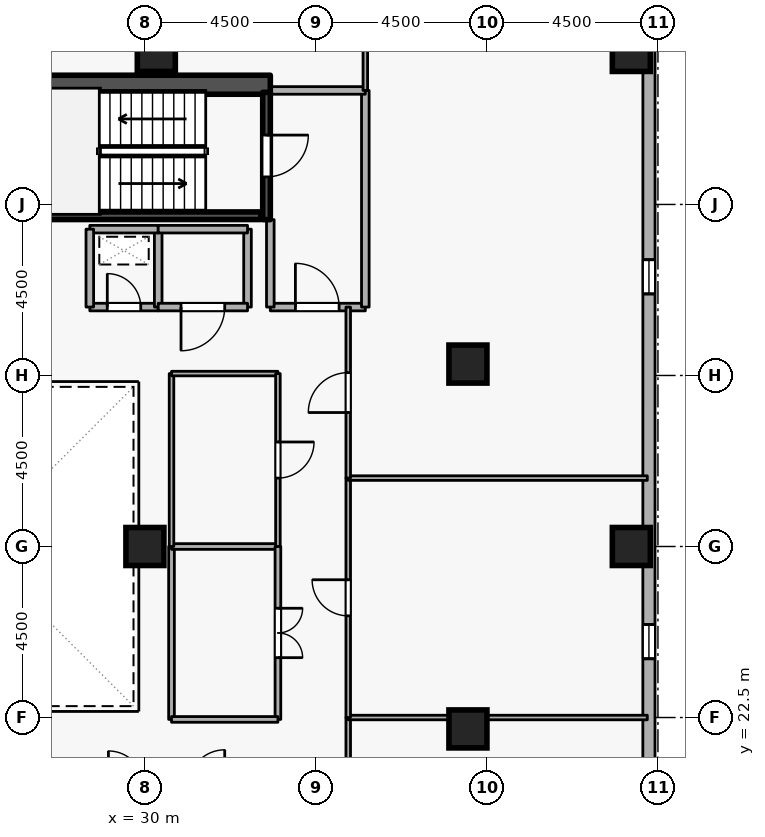
"""IFC4 building model, lengths in metres.
Left out: names, types, materials, properties, quantities, classifications, styles, units other than length and angle.
Written with IfcOpenShell. Run it as: python <this file> out.ifc"""

import sys

from ifc_helpers import new_model, si_unit, direction, frame, frame_2d, origin, origin_2d, place, context, subcontext, project, spatial, rectangle, extrude, element, fill, save


model = new_model("IFC4")
c1 = context("Model", 3, precision=1e-05, world=origin(), true_north=direction((0.0, 1.0)))
c2 = subcontext(c1, "Body", "Model", "MODEL_VIEW")
j1 = project(units=[si_unit("LENGTHUNIT", "METRE"), si_unit("PLANEANGLEUNIT", "RADIAN")], contexts=[c1])
p1 = place(None, origin())
s1 = spatial("IfcSite", under=j1, at=p1, CompositionType="ELEMENT")
p2 = place(p1, origin())
s2 = spatial("IfcBuilding", under=s1, at=p2, CompositionType="ELEMENT")
p3 = place(p2, frame((0.0, 0.0, 210.9)))
s3 = spatial("IfcBuildingStorey", under=s2, at=p3, CompositionType="ELEMENT", Elevation=210.9)
p4 = place(p3, frame((17.7, 39.15, 0.0), z_axis=(0.0, 0.0, 1.0), x_axis=(1.0, 0.0, 0.0)))
e1 = element("IfcWall", 1, at=p4, inside=s3, PredefinedType="SHEAR", context=c2, shape_type="SweptSolid", body=[
    extrude(rectangle(XDim=15.6, YDim=0.5, at=frame_2d((7.8, 0.0))), origin(), (0.0, 0.0, 1.0), 3.6),
])
for number, where, z_axis, x_axis in (
    (2, (42.8, 27.0, 0.0), (0.0, 0.0, 1.0), (1.0, 0.0, 0.0)),
    (3, (42.8, 40.0, 0.0), (0.0, 0.0, 1.0), (1.0, 0.0, 0.0)),
    (4, (38.5, 22.2, 0.0), (0.0, 0.0, 1.0), (1.0, 0.0, 0.0)),
    (5, (38.5, 31.8, 0.0), (0.0, 0.0, 1.0), (1.0, 0.0, 0.0)),
    (6, (30.3, 40.0, 0.0), (0.0, 0.0, 1.0), (1.0, 0.0, 0.0)),
    (7, (30.0, 27.0, 0.0), (0.0, 0.0, 1.0), (1.0, 0.0, 0.0)),
):
    element("IfcColumn", number, at=place(p3, frame(where, z_axis=z_axis, x_axis=x_axis)), inside=s3, PredefinedType="COLUMN", context=c2, shape_type="SweptSolid", body=[
        extrude(rectangle(XDim=1.0, YDim=1.0, at=origin_2d()), origin(), (0.0, 0.0, 1.0), 3.6),
    ])
p5 = place(p3, frame((43.262, 12.646, 0.0), z_axis=(0.0, 0.0, 1.0), x_axis=(7.5574884e-05, 0.999999997144, 0.0)))
e8 = element("IfcWall", 8, at=p5, inside=s3, PredefinedType="STANDARD", context=c2, shape_type="SweptSolid", body=[
    extrude(rectangle(XDim=35.535, YDim=0.32, at=frame_2d((17.768, 0.0))), origin(), (0.0, 0.0, 1.0), 2.7),
])
p6 = place(p5, frame((6.6, 0.0, 0.72)))
e9 = element("IfcOpeningElement", 9, at=p6, cuts=e8, PredefinedType="OPENING", context=c2, shape_type="SweptSolid", body=[
    extrude(rectangle(XDim=0.9, YDim=1.75, at=frame_2d((0.45, 0.875))), frame((0.0, 0.17, 0.0), z_axis=(0.0, -1.0, 0.0), x_axis=(1.0, 0.0, 0.0)), (0.0, 0.0, 1.0), 0.34),
])
p7 = place(p5, frame((11.4, 0.0, 0.72)))
e10 = element("IfcOpeningElement", 10, at=p7, cuts=e8, PredefinedType="OPENING", context=c2, shape_type="SweptSolid", body=[
    extrude(rectangle(XDim=0.9, YDim=1.75, at=frame_2d((0.45, 0.875))), frame((0.0, 0.17, 0.0), z_axis=(0.0, -1.0, 0.0), x_axis=(1.0, 0.0, 0.0)), (0.0, 0.0, 1.0), 0.34),
])
p8 = place(p5, frame((21.0, 0.0, 0.72)))
e11 = element("IfcOpeningElement", 11, at=p8, cuts=e8, PredefinedType="OPENING", context=c2, shape_type="SweptSolid", body=[
    extrude(rectangle(XDim=0.9, YDim=1.75, at=frame_2d((0.45, 0.875))), frame((0.0, 0.17, 0.0), z_axis=(0.0, -1.0, 0.0), x_axis=(1.0, 0.0, 0.0)), (0.0, 0.0, 1.0), 0.34),
])
p9 = place(p5, frame((30.6, 0.0, 0.72)))
e12 = element("IfcOpeningElement", 12, at=p9, cuts=e8, PredefinedType="OPENING", context=c2, shape_type="SweptSolid", body=[
    extrude(rectangle(XDim=0.9, YDim=1.75, at=frame_2d((0.45, 0.875))), frame((0.0, 0.17, 0.0), z_axis=(0.0, -1.0, 0.0), x_axis=(1.0, 0.0, 0.0)), (0.0, 0.0, 1.0), 0.34),
])
p10 = place(p3, frame((33.2, 38.95, 0.0), z_axis=(0.0, 0.0, 1.0), x_axis=(0.0, -1.0, 0.0)))
e13 = element("IfcWall", 13, at=p10, inside=s3, PredefinedType="SHEAR", context=c2, shape_type="SweptSolid", body=[
    extrude(rectangle(XDim=3.35, YDim=0.2, at=frame_2d((1.675, 0.0))), origin(), (0.0, 0.0, 1.0), 3.6),
])
p11 = place(p10, frame((1.125, 0.0, 0.0)))
e14 = element("IfcOpeningElement", 14, at=p11, cuts=e13, PredefinedType="OPENING", context=c2, shape_type="SweptSolid", body=[
    extrude(rectangle(XDim=1.1, YDim=2.1, at=frame_2d((0.55, 1.05))), frame((0.0, 0.11, 0.0), z_axis=(0.0, -1.0, 0.0), x_axis=(1.0, 0.0, 0.0)), (0.0, 0.0, 1.0), 0.22),
])
p12 = place(p3, frame((25.95, 35.703, 0.0), z_axis=(0.0, 0.0, 1.0), x_axis=(1.0, 0.0, 0.0)))
e15 = element("IfcWall", 15, at=p12, inside=s3, PredefinedType="SHEAR", context=c2, shape_type="SweptSolid", body=[
    extrude(rectangle(XDim=7.1, YDim=0.2, at=frame_2d((3.55, 0.0))), origin(), (0.0, 0.0, 1.0), 3.6),
])
p13 = place(p3, frame((33.3, 33.3, 0.0), z_axis=(0.0, 0.0, 1.0), x_axis=(1.0, 0.0, 0.0)))
e16 = element("IfcWall", 16, at=p13, inside=s3, PredefinedType="STANDARD", context=c2, shape_type="SweptSolid", body=[
    extrude(rectangle(XDim=2.5, YDim=0.2, at=frame_2d((1.25, 0.0))), origin(), (0.0, 0.0, 1.0), 3.34),
])
p14 = place(p13, frame((0.66, 0.0, 0.0)))
e17 = element("IfcOpeningElement", 17, at=p14, cuts=e16, PredefinedType="OPENING", context=c2, shape_type="SweptSolid", body=[
    extrude(rectangle(XDim=1.15, YDim=2.1, at=frame_2d((0.575, 1.05))), frame((0.0, 0.11, 0.0), z_axis=(0.0, -1.0, 0.0), x_axis=(1.0, 0.0, 0.0)), (0.0, 0.0, 1.0), 0.22),
])
p15 = place(p3, frame((35.8, 33.3, 0.0), z_axis=(0.0, 0.0, 1.0), x_axis=(0.0, 1.0, 0.0)))
e18 = element("IfcWall", 18, at=p15, inside=s3, PredefinedType="STANDARD", context=c2, shape_type="SweptSolid", body=[
    extrude(rectangle(XDim=5.7, YDim=0.2, at=frame_2d((2.85, 0.0))), origin(), (0.0, 0.0, 1.0), 3.34),
])
p16 = place(p3, frame((35.8, 39.0, 0.0), z_axis=(0.0, 0.0, 1.0), x_axis=(-1.0, 0.0, 0.0)))
e19 = element("IfcWall", 19, at=p16, inside=s3, PredefinedType="STANDARD", context=c2, shape_type="SweptSolid", body=[
    extrude(rectangle(XDim=2.5, YDim=0.2, at=frame_2d((1.25, 0.0))), origin(), (0.0, 0.0, 1.0), 3.34),
])
p17 = place(p3, frame((33.3, 35.6, 0.0), z_axis=(0.0, 0.0, 1.0), x_axis=(0.0, -1.0, 0.0)))
e20 = element("IfcWall", 20, at=p17, inside=s3, PredefinedType="STANDARD", context=c2, shape_type="SweptSolid", body=[
    extrude(rectangle(XDim=2.3, YDim=0.2, at=frame_2d((1.15, 0.0))), origin(), (0.0, 0.0, 1.0), 2.545),
])
p18 = place(p3, frame((28.55, 33.3, 0.0), z_axis=(0.0, 0.0, 1.0), x_axis=(1.0, 0.0, 0.0)))
e21 = element("IfcWall", 21, at=p18, inside=s3, PredefinedType="STANDARD", context=c2, shape_type="SweptSolid", body=[
    extrude(rectangle(XDim=1.8, YDim=0.2, at=frame_2d((0.9, 0.0))), origin(), (0.0, 0.0, 1.0), 3.34),
])
p19 = place(p18, frame((0.46, 0.0, 0.0)))
e22 = element("IfcOpeningElement", 22, at=p19, cuts=e21, PredefinedType="OPENING", context=c2, shape_type="SweptSolid", body=[
    extrude(rectangle(XDim=0.88, YDim=2.04, at=frame_2d((0.44, 1.02))), frame((0.0, 0.11, 0.0), z_axis=(0.0, -1.0, 0.0), x_axis=(1.0, 0.0, 0.0)), (0.0, 0.0, 1.0), 0.22),
])
p20 = place(p3, frame((30.35, 33.3, 0.0), z_axis=(0.0, 0.0, 1.0), x_axis=(0.0, 1.0, 0.0)))
e23 = element("IfcWall", 23, at=p20, inside=s3, PredefinedType="STANDARD", context=c2, shape_type="SweptSolid", body=[
    extrude(rectangle(XDim=2.05, YDim=0.2, at=frame_2d((1.025, 0.0))), origin(), (0.0, 0.0, 1.0), 3.34),
])
p21 = place(p3, frame((30.35, 35.35, 0.0), z_axis=(0.0, 0.0, 1.0), x_axis=(-1.0, 0.0, 0.0)))
e24 = element("IfcWall", 24, at=p21, inside=s3, PredefinedType="STANDARD", context=c2, shape_type="SweptSolid", body=[
    extrude(rectangle(XDim=1.8, YDim=0.2, at=frame_2d((0.9, 0.0))), origin(), (0.0, 0.0, 1.0), 3.34),
])
p22 = place(p3, frame((28.55, 35.35, 0.0), z_axis=(0.0, 0.0, 1.0), x_axis=(0.0, -1.0, 0.0)))
e25 = element("IfcWall", 25, at=p22, inside=s3, PredefinedType="STANDARD", context=c2, shape_type="SweptSolid", body=[
    extrude(rectangle(XDim=2.05, YDim=0.2, at=frame_2d((1.025, 0.0))), origin(), (0.0, 0.0, 1.0), 3.34),
])
p23 = place(p3, frame((32.7, 35.35, 0.0), z_axis=(0.0, 0.0, 1.0), x_axis=(0.0, -1.0, 0.0)))
e26 = element("IfcWall", 26, at=p23, inside=s3, PredefinedType="STANDARD", context=c2, shape_type="SweptSolid", body=[
    extrude(rectangle(XDim=2.05, YDim=0.2, at=frame_2d((1.025, 0.0))), origin(), (0.0, 0.0, 1.0), 2.545),
])
p24 = place(p3, frame((32.7, 33.3, 0.0), z_axis=(0.0, 0.0, 1.0), x_axis=(-1.0, 0.0, 0.0)))
e27 = element("IfcWall", 27, at=p24, inside=s3, PredefinedType="STANDARD", context=c2, shape_type="SweptSolid", body=[
    extrude(rectangle(XDim=2.35, YDim=0.2, at=frame_2d((1.175, 0.0))), origin(), (0.0, 0.0, 1.0), 3.34),
])
p25 = place(p24, frame((0.6, 0.0, 0.0)))
e28 = element("IfcOpeningElement", 28, at=p25, cuts=e27, PredefinedType="OPENING", context=c2, shape_type="SweptSolid", body=[
    extrude(rectangle(XDim=1.15, YDim=2.1, at=frame_2d((0.575, 1.05))), frame((0.0, 0.11, 0.0), z_axis=(0.0, -1.0, 0.0), x_axis=(1.0, 0.0, 0.0)), (0.0, 0.0, 1.0), 0.22),
])
p26 = place(p3, frame((30.35, 35.35, 0.0), z_axis=(0.0, 0.0, 1.0), x_axis=(1.0, 0.0, 0.0)))
e29 = element("IfcWall", 29, at=p26, inside=s3, PredefinedType="STANDARD", context=c2, shape_type="SweptSolid", body=[
    extrude(rectangle(XDim=2.35, YDim=0.2, at=frame_2d((1.175, 0.0))), origin(), (0.0, 0.0, 1.0), 3.34),
])
p27 = place(p3, frame((35.35, 14.8, 0.0), z_axis=(0.0, 0.0, 1.0), x_axis=(0.0, 1.0, 0.0)))
e30 = element("IfcWall", 30, at=p27, inside=s3, PredefinedType="PARTITIONING", context=c2, shape_type="SweptSolid", body=[
    extrude(rectangle(XDim=7.7, YDim=0.12, at=frame_2d((3.85, 0.0))), origin(), (0.0, 0.0, 1.0), 3.34),
])
p28 = place(p27, frame((3.325, 0.0, 0.0)))
e31 = element("IfcOpeningElement", 31, at=p28, cuts=e30, PredefinedType="OPENING", context=c2, shape_type="SweptSolid", body=[
    extrude(rectangle(XDim=1.05, YDim=2.1, at=frame_2d((0.525, 1.05))), frame((0.0, 0.07, 0.0), z_axis=(0.0, -1.0, 0.0), x_axis=(1.0, 0.0, 0.0)), (0.0, 0.0, 1.0), 0.14),
])
p29 = place(p3, frame((35.35, 22.5, 0.0), z_axis=(0.0, 0.0, 1.0), x_axis=(1.0, 0.0, 0.0)))
e32 = element("IfcWall", 32, at=p29, inside=s3, PredefinedType="PARTITIONING", context=c2, shape_type="SweptSolid", body=[
    extrude(rectangle(XDim=7.87, YDim=0.12, at=frame_2d((3.935, 0.0))), origin(), (0.0, 0.0, 1.0), 3.34),
])
p30 = place(p3, frame((35.35, 22.5, 0.0), z_axis=(0.0, 0.0, 1.0), x_axis=(0.0, 1.0, 0.0)))
e33 = element("IfcWall", 33, at=p30, inside=s3, PredefinedType="PARTITIONING", context=c2, shape_type="SweptSolid", body=[
    extrude(rectangle(XDim=6.3, YDim=0.12, at=frame_2d((3.15, 0.0))), origin(), (0.0, 0.0, 1.0), 3.34),
])
p31 = place(p30, frame((2.675, 0.0, 0.0)))
e34 = element("IfcOpeningElement", 34, at=p31, cuts=e33, PredefinedType="OPENING", context=c2, shape_type="SweptSolid", body=[
    extrude(rectangle(XDim=0.95, YDim=2.1, at=frame_2d((0.475, 1.05))), frame((0.0, 0.07, 0.0), z_axis=(0.0, -1.0, 0.0), x_axis=(1.0, 0.0, 0.0)), (0.0, 0.0, 1.0), 0.14),
])
p32 = place(p3, frame((35.35, 28.8, 0.0), z_axis=(0.0, 0.0, 1.0), x_axis=(1.0, 0.0, 0.0)))
e35 = element("IfcWall", 35, at=p32, inside=s3, PredefinedType="PARTITIONING", context=c2, shape_type="SweptSolid", body=[
    extrude(rectangle(XDim=7.87, YDim=0.12, at=frame_2d((3.935, 0.0))), origin(), (0.0, 0.0, 1.0), 3.34),
])
p33 = place(p3, frame((35.8, 39.0, 0.0), z_axis=(0.0, 0.0, 1.0), x_axis=(0.0, 1.0, 0.0)))
e36 = element("IfcWall", 36, at=p33, inside=s3, PredefinedType="PARTITIONING", context=c2, shape_type="SweptSolid", body=[
    extrude(rectangle(XDim=11.72, YDim=0.12, at=frame_2d((5.86, 0.0))), origin(), (0.0, 0.0, 1.0), 3.34),
])
p34 = place(p3, frame((35.35, 28.8, 0.0), z_axis=(0.0, 0.0, 1.0), x_axis=(0.0, 1.0, 0.0)))
e37 = element("IfcWall", 37, at=p34, inside=s3, PredefinedType="PARTITIONING", context=c2, shape_type="SweptSolid", body=[
    extrude(rectangle(XDim=4.5, YDim=0.12, at=frame_2d((2.25, 0.0))), origin(), (0.0, 0.0, 1.0), 3.34),
])
p35 = place(p34, frame((1.725, 0.0, 0.0)))
e38 = element("IfcOpeningElement", 38, at=p35, cuts=e37, PredefinedType="OPENING", context=c2, shape_type="SweptSolid", body=[
    extrude(rectangle(XDim=1.05, YDim=2.1, at=frame_2d((0.525, 1.05))), frame((0.0, 0.07, 0.0), z_axis=(0.0, -1.0, 0.0), x_axis=(1.0, 0.0, 0.0)), (0.0, 0.0, 1.0), 0.14),
])
p36 = place(p3, frame((30.7, 22.45, 0.0), z_axis=(0.0, 0.0, 1.0), x_axis=(0.0, 1.0, 0.0)))
e39 = element("IfcWall", 39, at=p36, inside=s3, PredefinedType="PARTITIONING", context=c2, shape_type="SweptSolid", body=[
    extrude(rectangle(XDim=4.55, YDim=0.15, at=frame_2d((2.275, 0.0))), origin(), (0.0, 0.0, 1.0), 3.34),
])
p37 = place(p3, frame((30.7, 27.0, 0.0), z_axis=(0.0, 0.0, 1.0), x_axis=(1.0, 0.0, 0.0)))
e40 = element("IfcWall", 40, at=p37, inside=s3, PredefinedType="PARTITIONING", context=c2, shape_type="SweptSolid", body=[
    extrude(rectangle(XDim=2.8, YDim=0.15, at=frame_2d((1.4, 0.0))), origin(), (0.0, 0.0, 1.0), 2.878),
])
p38 = place(p3, frame((33.5, 27.0, 0.0), z_axis=(0.0, 0.0, 1.0), x_axis=(0.0, -1.0, 0.0)))
e41 = element("IfcWall", 41, at=p38, inside=s3, PredefinedType="PARTITIONING", context=c2, shape_type="SweptSolid", body=[
    extrude(rectangle(XDim=4.55, YDim=0.15, at=frame_2d((2.275, 0.0))), origin(), (0.0, 0.0, 1.0), 3.34),
])
p39 = place(p38, frame((1.625, 0.0, 0.0)))
e42 = element("IfcOpeningElement", 42, at=p39, cuts=e41, PredefinedType="OPENING", context=c2, shape_type="SweptSolid", body=[
    extrude(rectangle(XDim=1.3, YDim=2.12, at=frame_2d((0.65, 1.06))), frame((0.0, 0.085, 0.0), z_axis=(0.0, -1.0, 0.0), x_axis=(1.0, 0.0, 0.0)), (0.0, 0.0, 1.0), 0.17),
])
p40 = place(p3, frame((33.5, 22.45, 0.0), z_axis=(0.0, 0.0, 1.0), x_axis=(-1.0, 0.0, 0.0)))
e43 = element("IfcWall", 43, at=p40, inside=s3, PredefinedType="PARTITIONING", context=c2, shape_type="SweptSolid", body=[
    extrude(rectangle(XDim=2.8, YDim=0.15, at=frame_2d((1.4, 0.0))), origin(), (0.0, 0.0, 1.0), 3.34),
])
p41 = place(p3, frame((30.7, 27.0, 0.0), z_axis=(0.0, 0.0, 1.0), x_axis=(0.0, 1.0, 0.0)))
e44 = element("IfcWall", 44, at=p41, inside=s3, PredefinedType="PARTITIONING", context=c2, shape_type="SweptSolid", body=[
    extrude(rectangle(XDim=4.55, YDim=0.12, at=frame_2d((2.275, 0.0))), origin(), (0.0, 0.0, 1.0), 3.34),
])
p42 = place(p3, frame((30.7, 31.55, 0.0), z_axis=(0.0, 0.0, 1.0), x_axis=(1.0, 0.0, 0.0)))
e45 = element("IfcWall", 45, at=p42, inside=s3, PredefinedType="PARTITIONING", context=c2, shape_type="SweptSolid", body=[
    extrude(rectangle(XDim=2.8, YDim=0.12, at=frame_2d((1.4, 0.0))), origin(), (0.0, 0.0, 1.0), 3.34),
])
p43 = place(p3, frame((33.5, 31.55, 0.0), z_axis=(0.0, 0.0, 1.0), x_axis=(0.0, -1.0, 0.0)))
e46 = element("IfcWall", 46, at=p43, inside=s3, PredefinedType="PARTITIONING", context=c2, shape_type="SweptSolid", body=[
    extrude(rectangle(XDim=4.55, YDim=0.12, at=frame_2d((2.275, 0.0))), origin(), (0.0, 0.0, 1.0), 3.34),
])
p44 = place(p43, frame((1.8, 0.0, 0.0)))
e47 = element("IfcOpeningElement", 47, at=p44, cuts=e46, PredefinedType="OPENING", context=c2, shape_type="SweptSolid", body=[
    extrude(rectangle(XDim=0.95, YDim=2.1, at=frame_2d((0.475, 1.05))), frame((0.0, 0.07, 0.0), z_axis=(0.0, -1.0, 0.0), x_axis=(1.0, 0.0, 0.0)), (0.0, 0.0, 1.0), 0.14),
])
p45 = place(p7, origin())
e48 = element("IfcWindow", 48, at=p45, inside=s3, PartitioningType="SINGLE_PANEL", PredefinedType="WINDOW", context=c2, shape_type="SweptSolid", body=[
    extrude(rectangle(XDim=0.9, YDim=1.75, at=frame_2d((0.45, 0.875))), frame((0.0, 0.03, 0.0), z_axis=(0.0, -1.0, 0.0), x_axis=(1.0, 0.0, 0.0)), (0.0, 0.0, 1.0), 0.06),
])
fill(e10, e48)
p46 = place(p8, origin())
e49 = element("IfcWindow", 49, at=p46, inside=s3, PartitioningType="SINGLE_PANEL", PredefinedType="WINDOW", context=c2, shape_type="SweptSolid", body=[
    extrude(rectangle(XDim=0.9, YDim=1.75, at=frame_2d((0.45, 0.875))), frame((0.0, 0.03, 0.0), z_axis=(0.0, -1.0, 0.0), x_axis=(1.0, 0.0, 0.0)), (0.0, 0.0, 1.0), 0.06),
])
fill(e11, e49)
p47 = place(p11, origin())
e50 = element("IfcDoor", 50, at=p47, inside=s3, OperationType="SINGLE_SWING_LEFT", PredefinedType="DOOR", context=c2, shape_type="SweptSolid", body=[
    extrude(rectangle(XDim=1.1, YDim=2.1, at=frame_2d((0.55, 1.05))), frame((0.0, 0.025, 0.0), z_axis=(0.0, -1.0, 0.0), x_axis=(1.0, 0.0, 0.0)), (0.0, 0.0, 1.0), 0.05),
])
fill(e14, e50)
p48 = place(p14, origin())
e51 = element("IfcDoor", 51, at=p48, inside=s3, OperationType="SINGLE_SWING_LEFT", PredefinedType="DOOR", context=c2, shape_type="SweptSolid", body=[
    extrude(rectangle(XDim=1.15, YDim=2.1, at=frame_2d((0.575, 1.05))), frame((0.0, 0.025, 0.0), z_axis=(0.0, -1.0, 0.0), x_axis=(1.0, 0.0, 0.0)), (0.0, 0.0, 1.0), 0.05),
])
fill(e17, e51)
p49 = place(p19, origin())
e52 = element("IfcDoor", 52, at=p49, inside=s3, OperationType="SINGLE_SWING_LEFT", PredefinedType="DOOR", context=c2, shape_type="SweptSolid", body=[
    extrude(rectangle(XDim=0.88, YDim=2.04, at=frame_2d((0.44, 1.02))), frame((0.0, 0.025, 0.0), z_axis=(0.0, -1.0, 0.0), x_axis=(1.0, 0.0, 0.0)), (0.0, 0.0, 1.0), 0.05),
])
fill(e22, e52)
p50 = place(p25, origin())
e53 = element("IfcDoor", 53, at=p50, inside=s3, OperationType="SINGLE_SWING_RIGHT", PredefinedType="DOOR", context=c2, shape_type="SweptSolid", body=[
    extrude(rectangle(XDim=1.15, YDim=2.1, at=frame_2d((0.575, 1.05))), frame((0.0, 0.025, 0.0), z_axis=(0.0, -1.0, 0.0), x_axis=(1.0, 0.0, 0.0)), (0.0, 0.0, 1.0), 0.05),
])
fill(e28, e53)
p51 = place(p31, origin())
e54 = element("IfcDoor", 54, at=p51, inside=s3, OperationType="SINGLE_SWING_RIGHT", PredefinedType="DOOR", context=c2, shape_type="SweptSolid", body=[
    extrude(rectangle(XDim=0.95, YDim=2.1, at=frame_2d((0.475, 1.05))), frame((0.0, 0.025, 0.0), z_axis=(0.0, -1.0, 0.0), x_axis=(1.0, 0.0, 0.0)), (0.0, 0.0, 1.0), 0.05),
])
fill(e34, e54)
p52 = place(p35, origin())
e55 = element("IfcDoor", 55, at=p52, inside=s3, OperationType="SINGLE_SWING_LEFT", PredefinedType="DOOR", context=c2, shape_type="SweptSolid", body=[
    extrude(rectangle(XDim=1.05, YDim=2.1, at=frame_2d((0.525, 1.05))), frame((0.0, 0.025, 0.0), z_axis=(0.0, -1.0, 0.0), x_axis=(1.0, 0.0, 0.0)), (0.0, 0.0, 1.0), 0.05),
])
fill(e38, e55)
p53 = place(p39, origin())
e56 = element("IfcDoor", 56, at=p53, inside=s3, OperationType="DOUBLE_DOOR_SINGLE_SWING", PredefinedType="DOOR", context=c2, shape_type="SweptSolid", body=[
    extrude(rectangle(XDim=1.3, YDim=2.12, at=frame_2d((0.65, 1.06))), frame((0.0, 0.025, 0.0), z_axis=(0.0, -1.0, 0.0), x_axis=(1.0, 0.0, 0.0)), (0.0, 0.0, 1.0), 0.05),
])
fill(e42, e56)
p54 = place(p44, origin())
e57 = element("IfcDoor", 57, at=p54, inside=s3, OperationType="SINGLE_SWING_LEFT", PredefinedType="DOOR", context=c2, shape_type="SweptSolid", body=[
    extrude(rectangle(XDim=0.95, YDim=2.1, at=frame_2d((0.475, 1.05))), frame((0.0, 0.025, 0.0), z_axis=(0.0, -1.0, 0.0), x_axis=(1.0, 0.0, 0.0)), (0.0, 0.0, 1.0), 0.05),
])
fill(e47, e57)
save(model, sys.argv[1])
